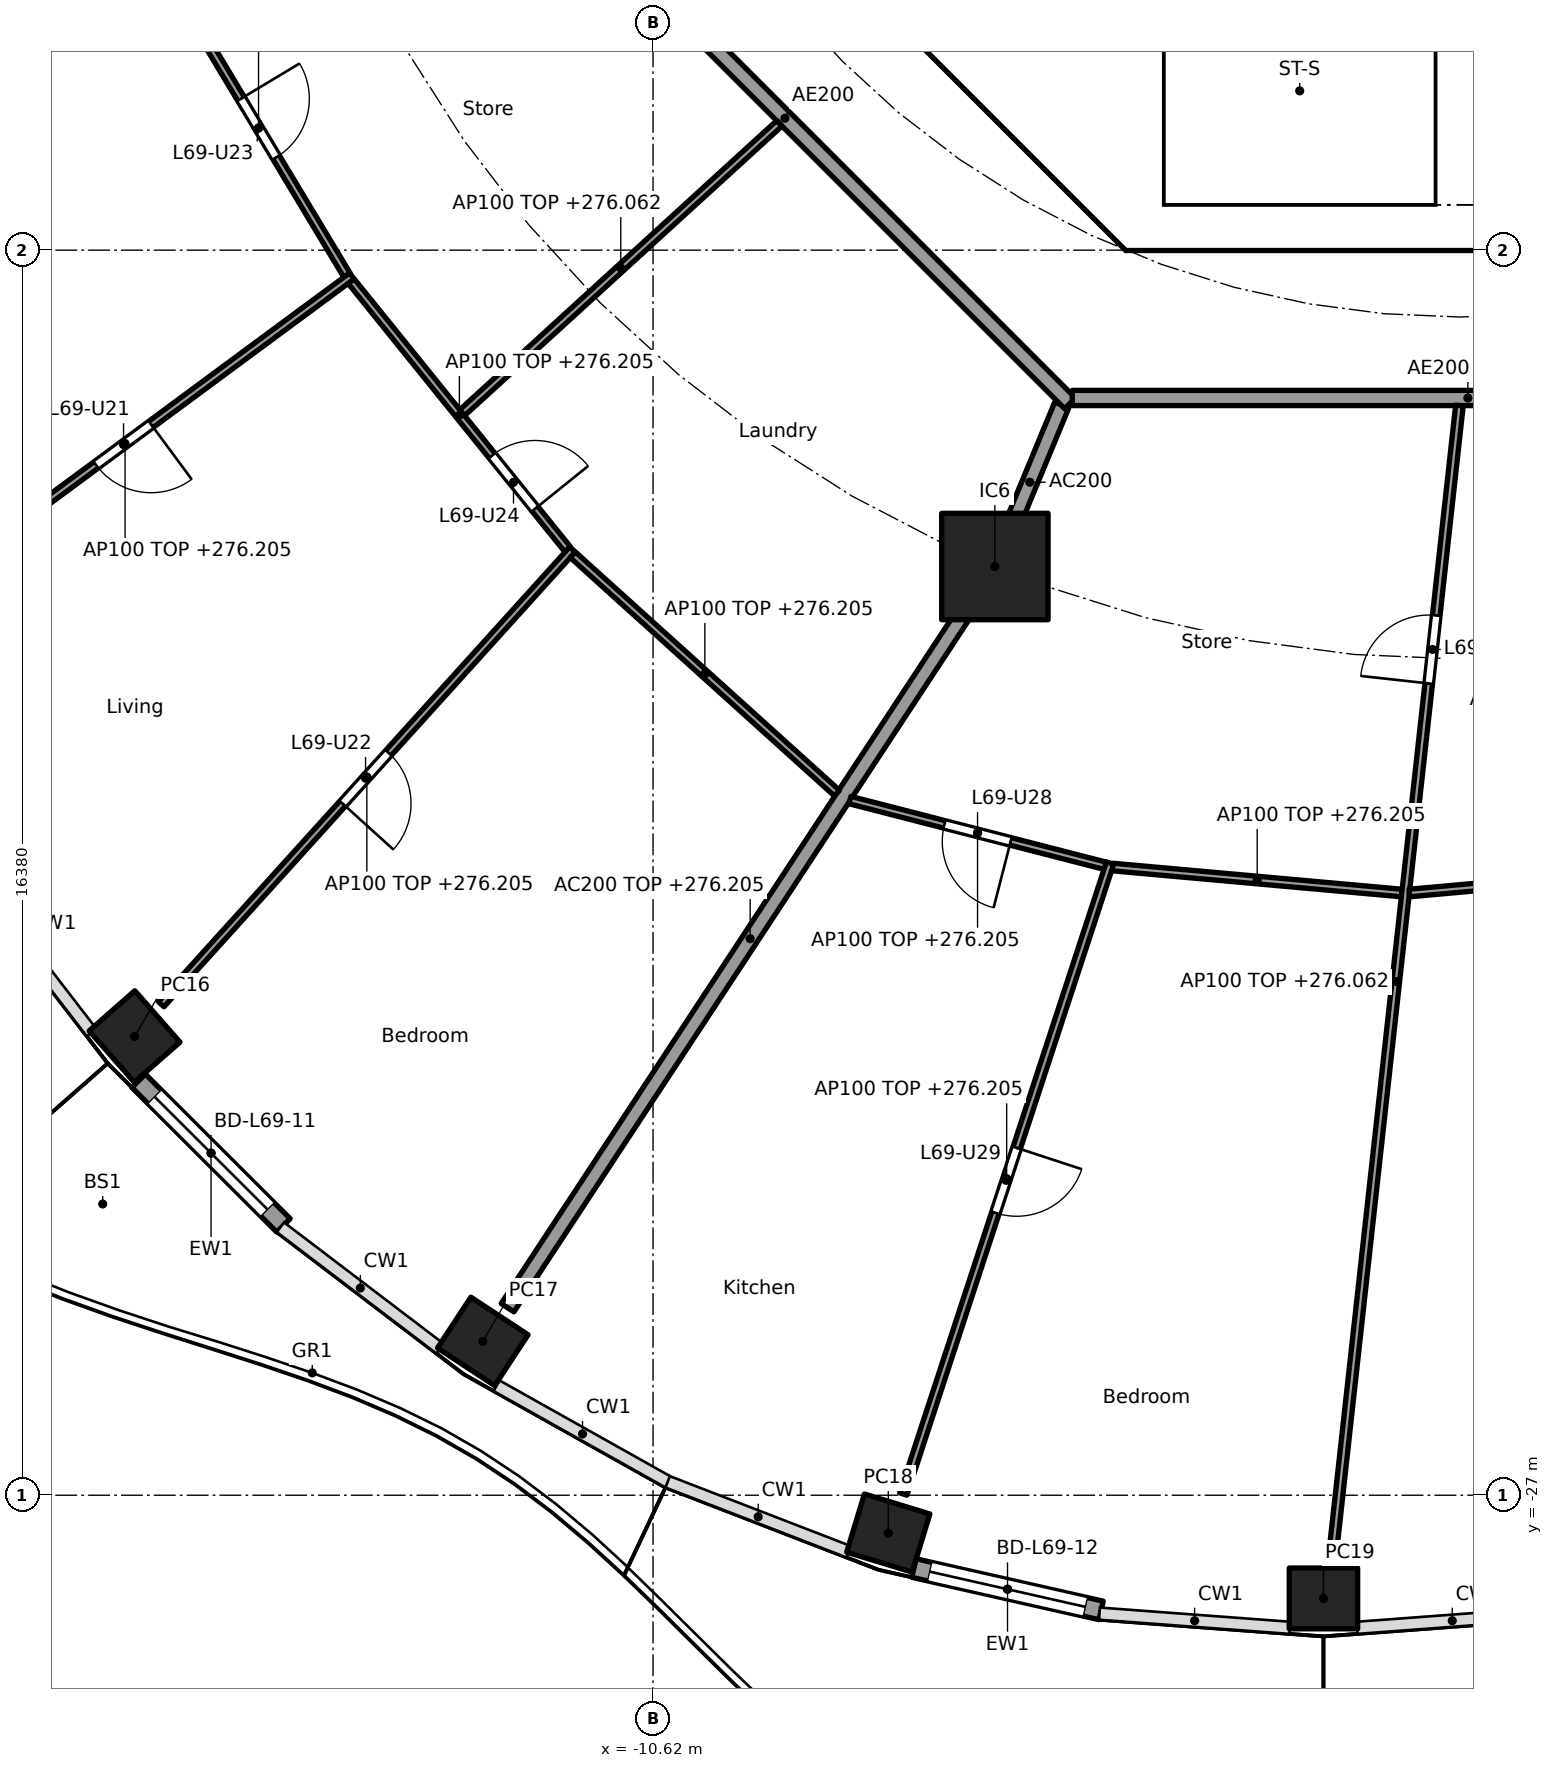
"""IFC4 building model, lengths in metres.
Left out: names, types, materials, properties, quantities, classifications, styles, units other than length and angle.
Written with IfcOpenShell. Run it as: python <this file> out.ifc"""

import sys

from ifc_helpers import new_model, si_unit, direction, frame, frame_2d, origin, origin_2d, place, context, subcontext, project, spatial, polyline, rectangle, hollow_rectangle, outline, extrude, element, fill, save


model = new_model("IFC4")
c1 = context("Model", 3, precision=1e-05, world=origin(), true_north=direction((0.0, 1.0)))
c2 = subcontext(c1, "Body", "Model", "MODEL_VIEW")
j1 = project(units=[si_unit("LENGTHUNIT", "METRE"), si_unit("PLANEANGLEUNIT", "RADIAN")], contexts=[c1])
p1 = place(None, origin())
s1 = spatial("IfcSite", under=j1, at=p1, CompositionType="ELEMENT")
p2 = place(p1, origin())
s2 = spatial("IfcBuilding", under=s1, at=p2, CompositionType="ELEMENT")
p3 = place(p2, frame((0.0, 0.0, 273.3)))
s3 = spatial("IfcBuildingStorey", under=s2, at=p3, CompositionType="ELEMENT", Elevation=273.3)
for number, where, z_axis, x_axis in (
    (1, (-17.441, -20.965, 0.0), (0.0, 0.0, 1.0), (0.66, -0.751, 0.0)),
    (2, (-12.86, -24.976, 0.0), (0.0, 0.0, 1.0), (0.836, -0.549, 0.0)),
    (3, (-7.525, -27.498, 0.0), (0.0, 0.0, 1.0), (0.957, -0.292, 0.0)),
    (4, (-1.8, -28.358, 0.0), (0.0, 0.0, 1.0), (1.0, 0.0, 0.0)),
):
    element("IfcColumn", number, at=place(p3, frame(where, z_axis=z_axis, x_axis=x_axis)), inside=s3, PredefinedType="COLUMN", context=c2, shape_type="SweptSolid", body=[
        extrude(hollow_rectangle(XDim=0.9, YDim=0.8, WallThickness=0.028, at=origin_2d()), origin(), (0.0, 0.0, 1.0), 3.7),
    ])
p4 = place(p3, frame((-6.123, -14.782, 0.0), z_axis=(0.0, 0.0, 1.0), x_axis=(1.0, 0.0, 0.0)))
e5 = element("IfcColumn", 5, at=p4, inside=s3, PredefinedType="COLUMN", context=c2, shape_type="SweptSolid", body=[
    extrude(rectangle(XDim=1.4, YDim=1.4, at=origin_2d()), origin(), (0.0, 0.0, 1.0), 3.7),
])
p5 = place(p3, frame((-15.482, -23.45, 0.0), z_axis=(0.0, 0.0, 1.0), x_axis=(-0.707831739508, 0.706381078841, 0.0)))
e6 = element("IfcWall", 6, at=p5, inside=s3, PredefinedType="SOLIDWALL", context=c2, shape_type="SweptSolid", body=[
    extrude(rectangle(XDim=2.693, YDim=0.25, at=frame_2d((1.346, 0.0))), origin(), (0.0, 0.0, 1.0), 3.44),
])
p6 = place(p5, frame((0.296, 0.0, 0.0)))
e7 = element("IfcOpeningElement", 7, at=p6, cuts=e6, PredefinedType="OPENING", context=c2, shape_type="SweptSolid", body=[
    extrude(rectangle(XDim=2.1, YDim=2.4, at=frame_2d((1.05, 1.2))), frame((0.0, 0.135, 0.0), z_axis=(0.0, -1.0, 0.0), x_axis=(1.0, 0.0, 0.0)), (0.0, 0.0, 1.0), 0.27),
])
p7 = place(p3, frame((-4.725, -28.516, 0.0), z_axis=(0.0, 0.0, 1.0), x_axis=(-0.975319584032, 0.220797891756, 0.0)))
e8 = element("IfcWall", 8, at=p7, inside=s3, PredefinedType="SOLIDWALL", context=c2, shape_type="SweptSolid", body=[
    extrude(rectangle(XDim=2.525, YDim=0.25, at=frame_2d((1.263, 0.0))), origin(), (0.0, 0.0, 1.0), 3.44),
])
p8 = place(p7, frame((0.213, 0.0, 0.0)))
e9 = element("IfcOpeningElement", 9, at=p8, cuts=e8, PredefinedType="OPENING", context=c2, shape_type="SweptSolid", body=[
    extrude(rectangle(XDim=2.1, YDim=2.4, at=frame_2d((1.05, 1.2))), frame((0.0, 0.135, 0.0), z_axis=(0.0, -1.0, 0.0), x_axis=(1.0, 0.0, 0.0)), (0.0, 0.0, 1.0), 0.27),
])
p9 = place(p3, frame((-9.988, -4.613, 0.0), z_axis=(0.0, 0.0, 1.0), x_axis=(0.707106781187, -0.707106781187, 0.0)))
e10 = element("IfcWall", 10, at=p9, inside=s3, PredefinedType="SHEAR", context=c2, shape_type="SweptSolid", body=[
    extrude(rectangle(XDim=7.602, YDim=0.6, at=frame_2d((3.801, 0.0))), origin(), (0.0, 0.0, 1.0), 3.44),
])
p10 = place(p9, frame((6.151, 0.0, 0.0)))
e11 = element("IfcOpeningElement", 11, at=p10, cuts=e10, PredefinedType="OPENING", context=c2, shape_type="SweptSolid", body=[
    extrude(rectangle(XDim=1.1, YDim=2.1, at=frame_2d((0.55, 1.05))), frame((0.0, 0.31, 0.0), z_axis=(0.0, -1.0, 0.0), x_axis=(1.0, 0.0, 0.0)), (0.0, 0.0, 1.0), 0.62),
])
p11 = place(p3, frame((-5.8, -8.227, 0.0), z_axis=(0.0, 0.0, 1.0), x_axis=(0.0, 1.0, 0.0)))
e12 = element("IfcWall", 12, at=p11, inside=s3, PredefinedType="PARTITIONING", context=c2, shape_type="SweptSolid", body=[
    extrude(rectangle(XDim=3.927, YDim=0.15, at=frame_2d((1.963, 0.0))), origin(), (0.0, 0.0, 1.0), 3.44),
])
p12 = place(p11, frame((2.615, 0.0, 0.0)))
e13 = element("IfcOpeningElement", 13, at=p12, cuts=e12, PredefinedType="OPENING", context=c2, shape_type="SweptSolid", body=[
    extrude(rectangle(XDim=0.9, YDim=2.1, at=frame_2d((0.45, 1.05))), frame((0.0, 0.085, 0.0), z_axis=(0.0, -1.0, 0.0), x_axis=(1.0, 0.0, 0.0)), (0.0, 0.0, 1.0), 0.17),
])
p13 = place(p11, frame((0.539, 0.0, 0.0)))
e14 = element("IfcOpeningElement", 14, at=p13, cuts=e12, PredefinedType="OPENING", context=c2, shape_type="SweptSolid", body=[
    extrude(rectangle(XDim=0.9, YDim=2.1, at=frame_2d((0.45, 1.05))), frame((0.0, 0.085, 0.0), z_axis=(0.0, -1.0, 0.0), x_axis=(1.0, 0.0, 0.0)), (0.0, 0.0, 1.0), 0.17),
])
p14 = place(p3, origin())
e15 = element("IfcWall", 15, at=p14, inside=s3, PredefinedType="SHEAR", context=c2, shape_type="SweptSolid", body=[
    extrude(outline(polyline([(-4.152, -10.025), (4.152, -10.025), (4.401, -9.776), (4.825, -10.2), (4.401, -10.625), (-4.401, -10.625), (-4.825, -10.2), (-4.401, -9.776), (-4.152, -10.025)])), origin(), (0.0, 0.0, 1.0), 3.44),
])
p15 = place(p3, origin())
e16 = element("IfcWall", 16, at=p15, inside=s3, PredefinedType="SOLIDWALL", context=c2, shape_type="SweptSolid", body=[
    extrude(outline(polyline([(-3.9, -10.025), (-4.1, -10.025), (-4.1, -7.025), (-3.9, -7.025), (-3.9, -10.025)])), origin(), (0.0, 0.0, 1.0), 3.44),
])
p16 = place(p3, frame((-5.243, -12.657, 0.0), z_axis=(0.0, 0.0, 1.0), x_axis=(-0.382770106157, -0.923843626288, 0.0)))
e17 = element("IfcWall", 17, at=p16, inside=s3, PredefinedType="PARTITIONING", context=c2, shape_type="SweptSolid", body=[
    extrude(rectangle(XDim=2.199, YDim=0.2, at=frame_2d((1.1, 0.0))), origin(), (0.0, 0.0, 1.0), 3.44),
])
p17 = place(p3, frame((-6.151, -14.824, 0.0), z_axis=(0.0, 0.0, 1.0), x_axis=(-0.549345577828, -0.835595258556, 0.0)))
e18 = element("IfcWall", 18, at=p17, inside=s3, PredefinedType="PARTITIONING", context=c2, shape_type="SweptSolid", body=[
    extrude(rectangle(XDim=11.62, YDim=0.2, at=frame_2d((5.81, 0.0))), origin(), (0.0, 0.0, 1.0), 2.905),
])
p18 = place(p3, frame((-12.635, -5.134, 0.0), z_axis=(0.0, 0.0, 1.0), x_axis=(0.707106781187, -0.707106781187, 0.0)))
e19 = element("IfcWall", 19, at=p18, inside=s3, PredefinedType="PARTITIONING", context=c2, shape_type="SweptSolid", body=[
    extrude(rectangle(XDim=10.609, YDim=0.2, at=frame_2d((5.305, 0.0))), origin(), (0.0, 0.0, 1.0), 3.44),
])
p19 = place(p3, frame((-5.104, -12.565, 0.0), z_axis=(0.0, 0.0, 1.0), x_axis=(1.0, 0.0, 0.0)))
e20 = element("IfcWall", 20, at=p19, inside=s3, PredefinedType="PARTITIONING", context=c2, shape_type="SweptSolid", body=[
    extrude(rectangle(XDim=10.409, YDim=0.2, at=frame_2d((5.205, 0.0))), origin(), (0.0, 0.0, 1.0), 3.44),
])
p20 = place(p19, frame((5.906, 0.0, 0.0)))
e21 = element("IfcOpeningElement", 21, at=p20, cuts=e20, PredefinedType="OPENING", context=c2, shape_type="SweptSolid", body=[
    extrude(rectangle(XDim=1.0, YDim=2.1, at=frame_2d((0.5, 1.05))), frame((0.0, 0.11, 0.0), z_axis=(0.0, -1.0, 0.0), x_axis=(1.0, 0.0, 0.0)), (0.0, 0.0, 1.0), 0.22),
])
p21 = place(p3, frame((-14.828, -6.142, 0.0), z_axis=(0.0, 0.0, 1.0), x_axis=(-0.924478087429, -0.381235184451, 0.0)))
e22 = element("IfcWall", 22, at=p21, inside=s3, PredefinedType="PARTITIONING", context=c2, shape_type="SweptSolid", body=[
    extrude(rectangle(XDim=8.499, YDim=0.1, at=frame_2d((4.25, 0.0))), origin(), (0.0, 0.0, 1.0), 2.905),
])
p22 = place(p21, frame((4.973, 0.0, 0.0)))
e23 = element("IfcOpeningElement", 23, at=p22, cuts=e22, PredefinedType="OPENING", context=c2, shape_type="SweptSolid", body=[
    extrude(rectangle(XDim=0.9, YDim=2.1, at=frame_2d((0.45, 1.05))), frame((0.0, 0.06, 0.0), z_axis=(0.0, -1.0, 0.0), x_axis=(1.0, 0.0, 0.0)), (0.0, 0.0, 1.0), 0.12),
])
p23 = place(p3, frame((-16.972, -7.08, 0.0), z_axis=(0.0, 0.0, 1.0), x_axis=(0.514989049311, -0.857196756346, 0.0)))
e24 = element("IfcWall", 24, at=p23, inside=s3, PredefinedType="PARTITIONING", context=c2, shape_type="SweptSolid", body=[
    extrude(rectangle(XDim=4.512, YDim=0.1, at=frame_2d((2.256, 0.0))), origin(), (0.0, 0.0, 1.0), 2.905),
])
p24 = place(p23, frame((1.806, 0.0, 0.0)))
e25 = element("IfcOpeningElement", 25, at=p24, cuts=e24, PredefinedType="OPENING", context=c2, shape_type="SweptSolid", body=[
    extrude(rectangle(XDim=0.9, YDim=2.1, at=frame_2d((0.45, 1.05))), frame((0.0, 0.06, 0.0), z_axis=(0.0, -1.0, 0.0), x_axis=(1.0, 0.0, 0.0)), (0.0, 0.0, 1.0), 0.12),
])
p25 = place(p3, frame((-14.582, -10.96, 0.0), z_axis=(0.0, 0.0, 1.0), x_axis=(-0.804405200554, -0.594081032623, 0.0)))
e26 = element("IfcWall", 26, at=p25, inside=s3, PredefinedType="PARTITIONING", context=c2, shape_type="SweptSolid", body=[
    extrude(rectangle(XDim=7.418, YDim=0.1, at=frame_2d((3.709, 0.0))), origin(), (0.0, 0.0, 1.0), 2.905),
])
p26 = place(p25, frame((3.284, 0.0, 0.0)))
e27 = element("IfcOpeningElement", 27, at=p26, cuts=e26, PredefinedType="OPENING", context=c2, shape_type="SweptSolid", body=[
    extrude(rectangle(XDim=0.9, YDim=2.1, at=frame_2d((0.45, 1.05))), frame((0.0, 0.06, 0.0), z_axis=(0.0, -1.0, 0.0), x_axis=(1.0, 0.0, 0.0)), (0.0, 0.0, 1.0), 0.12),
])
p27 = place(p3, frame((-14.591, -11.029, 0.0), z_axis=(0.0, 0.0, 1.0), x_axis=(0.628170338674, -0.778075848237, 0.0)))
e28 = element("IfcWall", 28, at=p27, inside=s3, PredefinedType="PARTITIONING", context=c2, shape_type="SweptSolid", body=[
    extrude(rectangle(XDim=4.532, YDim=0.1, at=frame_2d((2.266, 0.0))), origin(), (0.0, 0.0, 1.0), 2.905),
])
p28 = place(p27, frame((2.949, 0.0, 0.0)))
e29 = element("IfcOpeningElement", 29, at=p28, cuts=e28, PredefinedType="OPENING", context=c2, shape_type="SweptSolid", body=[
    extrude(rectangle(XDim=0.9, YDim=2.1, at=frame_2d((0.45, 1.05))), frame((0.0, 0.06, 0.0), z_axis=(0.0, -1.0, 0.0), x_axis=(1.0, 0.0, 0.0)), (0.0, 0.0, 1.0), 0.12),
])
p29 = place(p3, frame((-8.958, -8.952, 0.0), z_axis=(0.0, 0.0, 1.0), x_axis=(-0.73876526954, -0.673962815385, 0.0)))
e30 = element("IfcWall", 30, at=p29, inside=s3, PredefinedType="PARTITIONING", context=c2, shape_type="SweptSolid", body=[
    extrude(rectangle(XDim=5.647, YDim=0.1, at=frame_2d((2.824, 0.0))), origin(), (0.0, 0.0, 1.0), 2.762),
])
p30 = place(p3, frame((-11.679, -14.557, 0.0), z_axis=(0.0, 0.0, 1.0), x_axis=(-0.670800011545, -0.741638284146, 0.0)))
e31 = element("IfcWall", 31, at=p30, inside=s3, PredefinedType="PARTITIONING", context=c2, shape_type="SweptSolid", body=[
    extrude(rectangle(XDim=8.068, YDim=0.1, at=frame_2d((4.034, 0.0))), origin(), (0.0, 0.0, 1.0), 2.905),
])
p31 = place(p30, frame((3.609, 0.0, 0.0)))
e32 = element("IfcOpeningElement", 32, at=p31, cuts=e31, PredefinedType="OPENING", context=c2, shape_type="SweptSolid", body=[
    extrude(rectangle(XDim=0.9, YDim=2.1, at=frame_2d((0.45, 1.05))), frame((0.0, 0.06, 0.0), z_axis=(0.0, -1.0, 0.0), x_axis=(1.0, 0.0, 0.0)), (0.0, 0.0, 1.0), 0.12),
])
p32 = place(p3, frame((-11.676, -14.628, 0.0), z_axis=(0.0, 0.0, 1.0), x_axis=(0.74245829867, -0.669892285921, 0.0)))
e33 = element("IfcWall", 33, at=p32, inside=s3, PredefinedType="PARTITIONING", context=c2, shape_type="SweptSolid", body=[
    extrude(rectangle(XDim=4.68, YDim=0.1, at=frame_2d((2.34, 0.0))), origin(), (0.0, 0.0, 1.0), 2.905),
])
p33 = place(p3, frame((-8.03, -17.854, 0.0), z_axis=(0.0, 0.0, 1.0), x_axis=(0.968441967324, -0.249239154077, 0.0)))
e34 = element("IfcWall", 34, at=p33, inside=s3, PredefinedType="PARTITIONING", context=c2, shape_type="SweptSolid", body=[
    extrude(rectangle(XDim=3.468, YDim=0.1, at=frame_2d((1.734, 0.0))), origin(), (0.0, 0.0, 1.0), 2.905),
])
p34 = place(p33, frame((1.284, 0.0, 0.0)))
e35 = element("IfcOpeningElement", 35, at=p34, cuts=e34, PredefinedType="OPENING", context=c2, shape_type="SweptSolid", body=[
    extrude(rectangle(XDim=0.9, YDim=2.1, at=frame_2d((0.45, 1.05))), frame((0.0, 0.06, 0.0), z_axis=(0.0, -1.0, 0.0), x_axis=(1.0, 0.0, 0.0)), (0.0, 0.0, 1.0), 0.12),
])
p35 = place(p3, frame((-4.608, -18.684, 0.0), z_axis=(0.0, 0.0, 1.0), x_axis=(-0.311419102378, -0.95027266754, 0.0)))
e36 = element("IfcWall", 36, at=p35, inside=s3, PredefinedType="PARTITIONING", context=c2, shape_type="SweptSolid", body=[
    extrude(rectangle(XDim=8.735, YDim=0.1, at=frame_2d((4.367, 0.0))), origin(), (0.0, 0.0, 1.0), 2.905),
])
p36 = place(p35, frame((3.942, 0.0, 0.0)))
e37 = element("IfcOpeningElement", 37, at=p36, cuts=e36, PredefinedType="OPENING", context=c2, shape_type="SweptSolid", body=[
    extrude(rectangle(XDim=0.9, YDim=2.1, at=frame_2d((0.45, 1.05))), frame((0.0, 0.06, 0.0), z_axis=(0.0, -1.0, 0.0), x_axis=(1.0, 0.0, 0.0)), (0.0, 0.0, 1.0), 0.12),
])
p37 = place(p3, frame((-4.573, -18.736, 0.0), z_axis=(0.0, 0.0, 1.0), x_axis=(0.995986472869, -0.089503887414, 0.0)))
e38 = element("IfcWall", 38, at=p37, inside=s3, PredefinedType="PARTITIONING", context=c2, shape_type="SweptSolid", body=[
    extrude(rectangle(XDim=3.819, YDim=0.1, at=frame_2d((1.909, 0.0))), origin(), (0.0, 0.0, 1.0), 2.905),
])
p38 = place(p3, frame((-0.011, -12.664, 0.0), z_axis=(0.0, 0.0, 1.0), x_axis=(-0.109805889692, -0.993953050495, 0.0)))
e39 = element("IfcWall", 39, at=p38, inside=s3, PredefinedType="PARTITIONING", context=c2, shape_type="SweptSolid", body=[
    extrude(rectangle(XDim=15.248, YDim=0.1, at=frame_2d((7.624, 0.0))), origin(), (0.0, 0.0, 1.0), 2.762),
])
p39 = place(p38, frame((2.778, 0.0, 0.0)))
e40 = element("IfcOpeningElement", 40, at=p39, cuts=e39, PredefinedType="OPENING", context=c2, shape_type="SweptSolid", body=[
    extrude(rectangle(XDim=0.9, YDim=2.1, at=frame_2d((0.45, 1.05))), frame((0.0, 0.06, 0.0), z_axis=(0.0, -1.0, 0.0), x_axis=(1.0, 0.0, 0.0)), (0.0, 0.0, 1.0), 0.12),
])
p40 = place(p3, frame((-0.67, -19.077, 0.0), z_axis=(0.0, 0.0, 1.0), x_axis=(0.995986472869, 0.089503887414, 0.0)))
e41 = element("IfcWall", 41, at=p40, inside=s3, PredefinedType="PARTITIONING", context=c2, shape_type="SweptSolid", body=[
    extrude(rectangle(XDim=3.819, YDim=0.1, at=frame_2d((1.909, 0.0))), origin(), (0.0, 0.0, 1.0), 2.905),
])
p41 = place(p40, frame((1.459, 0.0, 0.0)))
e42 = element("IfcOpeningElement", 42, at=p41, cuts=e41, PredefinedType="OPENING", context=c2, shape_type="SweptSolid", body=[
    extrude(rectangle(XDim=0.9, YDim=2.1, at=frame_2d((0.45, 1.05))), frame((0.0, 0.06, 0.0), z_axis=(0.0, -1.0, 0.0), x_axis=(1.0, 0.0, 0.0)), (0.0, 0.0, 1.0), 0.12),
])
p42 = place(p6, origin())
e43 = element("IfcDoor", 43, at=p42, inside=s3, OperationType="SLIDING_TO_LEFT", PredefinedType="DOOR", context=c2, shape_type="SweptSolid", body=[
    extrude(rectangle(XDim=2.1, YDim=2.4, at=frame_2d((1.05, 1.2))), frame((0.0, 0.025, 0.0), z_axis=(0.0, -1.0, 0.0), x_axis=(1.0, 0.0, 0.0)), (0.0, 0.0, 1.0), 0.05),
])
fill(e7, e43)
p43 = place(p8, origin())
e44 = element("IfcDoor", 44, at=p43, inside=s3, OperationType="SLIDING_TO_LEFT", PredefinedType="DOOR", context=c2, shape_type="SweptSolid", body=[
    extrude(rectangle(XDim=2.1, YDim=2.4, at=frame_2d((1.05, 1.2))), frame((0.0, 0.025, 0.0), z_axis=(0.0, -1.0, 0.0), x_axis=(1.0, 0.0, 0.0)), (0.0, 0.0, 1.0), 0.05),
])
fill(e9, e44)
p44 = place(p10, origin())
e45 = element("IfcDoor", 45, at=p44, inside=s3, OperationType="SINGLE_SWING_RIGHT", PredefinedType="DOOR", context=c2, shape_type="SweptSolid", body=[
    extrude(rectangle(XDim=1.1, YDim=2.1, at=frame_2d((0.55, 1.05))), frame((0.0, 0.025, 0.0), z_axis=(0.0, -1.0, 0.0), x_axis=(1.0, 0.0, 0.0)), (0.0, 0.0, 1.0), 0.05),
])
fill(e11, e45)
p45 = place(p26, origin())
e46 = element("IfcDoor", 46, at=p45, inside=s3, OperationType="SINGLE_SWING_LEFT", PredefinedType="DOOR", context=c2, shape_type="SweptSolid", body=[
    extrude(rectangle(XDim=0.9, YDim=2.1, at=frame_2d((0.45, 1.05))), frame((0.0, 0.025, 0.0), z_axis=(0.0, -1.0, 0.0), x_axis=(1.0, 0.0, 0.0)), (0.0, 0.0, 1.0), 0.05),
])
fill(e27, e46)
p46 = place(p31, origin())
e47 = element("IfcDoor", 47, at=p46, inside=s3, OperationType="SINGLE_SWING_RIGHT", PredefinedType="DOOR", context=c2, shape_type="SweptSolid", body=[
    extrude(rectangle(XDim=0.9, YDim=2.1, at=frame_2d((0.45, 1.05))), frame((0.0, 0.025, 0.0), z_axis=(0.0, -1.0, 0.0), x_axis=(1.0, 0.0, 0.0)), (0.0, 0.0, 1.0), 0.05),
])
fill(e32, e47)
p47 = place(p24, origin())
e48 = element("IfcDoor", 48, at=p47, inside=s3, OperationType="SINGLE_SWING_LEFT", PredefinedType="DOOR", context=c2, shape_type="SweptSolid", body=[
    extrude(rectangle(XDim=0.9, YDim=2.1, at=frame_2d((0.45, 1.05))), frame((0.0, 0.025, 0.0), z_axis=(0.0, -1.0, 0.0), x_axis=(1.0, 0.0, 0.0)), (0.0, 0.0, 1.0), 0.05),
])
fill(e25, e48)
p48 = place(p28, origin())
e49 = element("IfcDoor", 49, at=p48, inside=s3, OperationType="SINGLE_SWING_RIGHT", PredefinedType="DOOR", context=c2, shape_type="SweptSolid", body=[
    extrude(rectangle(XDim=0.9, YDim=2.1, at=frame_2d((0.45, 1.05))), frame((0.0, 0.025, 0.0), z_axis=(0.0, -1.0, 0.0), x_axis=(1.0, 0.0, 0.0)), (0.0, 0.0, 1.0), 0.05),
])
fill(e29, e49)
p49 = place(p39, frame((0.9, 0.0, 0.0), x_axis=(-1.0, 0.0, 0.0)))
e50 = element("IfcDoor", 50, at=p49, inside=s3, OperationType="SINGLE_SWING_LEFT", PredefinedType="DOOR", context=c2, shape_type="SweptSolid", body=[
    extrude(rectangle(XDim=0.9, YDim=2.1, at=frame_2d((0.45, 1.05))), frame((0.0, 0.025, 0.0), z_axis=(0.0, -1.0, 0.0), x_axis=(1.0, 0.0, 0.0)), (0.0, 0.0, 1.0), 0.05),
])
fill(e40, e50)
p50 = place(p34, frame((0.9, 0.0, 0.0), x_axis=(-1.0, 0.0, 0.0)))
e51 = element("IfcDoor", 51, at=p50, inside=s3, OperationType="SINGLE_SWING_LEFT", PredefinedType="DOOR", context=c2, shape_type="SweptSolid", body=[
    extrude(rectangle(XDim=0.9, YDim=2.1, at=frame_2d((0.45, 1.05))), frame((0.0, 0.025, 0.0), z_axis=(0.0, -1.0, 0.0), x_axis=(1.0, 0.0, 0.0)), (0.0, 0.0, 1.0), 0.05),
])
fill(e35, e51)
p51 = place(p36, origin())
e52 = element("IfcDoor", 52, at=p51, inside=s3, OperationType="SINGLE_SWING_LEFT", PredefinedType="DOOR", context=c2, shape_type="SweptSolid", body=[
    extrude(rectangle(XDim=0.9, YDim=2.1, at=frame_2d((0.45, 1.05))), frame((0.0, 0.025, 0.0), z_axis=(0.0, -1.0, 0.0), x_axis=(1.0, 0.0, 0.0)), (0.0, 0.0, 1.0), 0.05),
])
fill(e37, e52)
save(model, sys.argv[1])
